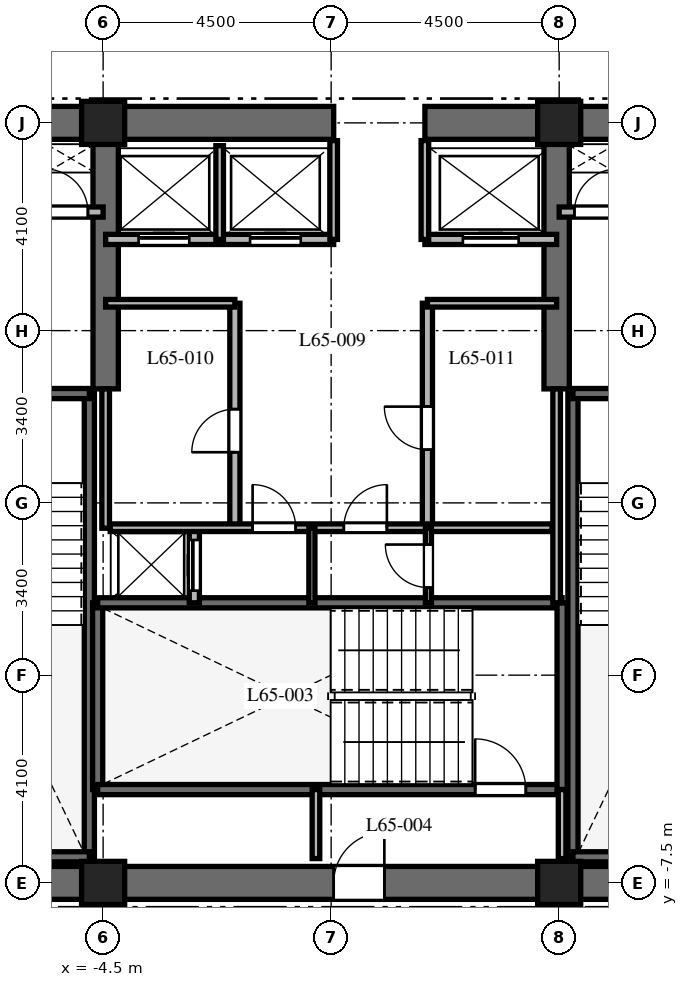
"""IFC4 building model, lengths in metres.
Left out: names, types, materials, properties, quantities, classifications, styles, units other than length and angle.
Written with IfcOpenShell. Run it as: python <this file> out.ifc"""

import sys

from ifc_helpers import new_model, si_unit, direction, frame, frame_2d, origin, origin_2d, place, context, subcontext, project, spatial, rectangle, extrude, element, fill, save


model = new_model("IFC4")
c1 = context("Model", 3, precision=1e-05, world=origin(), true_north=direction((0.0, 1.0)))
c2 = subcontext(c1, "Body", "Model", "MODEL_VIEW")
j1 = project(units=[si_unit("LENGTHUNIT", "METRE"), si_unit("PLANEANGLEUNIT", "RADIAN")], contexts=[c1])
p1 = place(None, origin())
s1 = spatial("IfcSite", under=j1, at=p1, CompositionType="ELEMENT")
p2 = place(p1, origin())
s2 = spatial("IfcBuilding", under=s1, at=p2, CompositionType="ELEMENT")
p3 = place(p2, frame((0.0, 0.0, 261.3)))
s3 = spatial("IfcBuildingStorey", under=s2, at=p3, CompositionType="ELEMENT", Elevation=261.3)
p4 = place(p3, frame((-9.325, -7.5, 0.0), z_axis=(0.0, 0.0, 1.0), x_axis=(1.0, 0.0, 0.0)))
e1 = element("IfcWall", 1, at=p4, inside=s3, PredefinedType="SHEAR", context=c2, shape_type="SweptSolid", body=[
    extrude(rectangle(XDim=18.65, YDim=0.65, at=frame_2d((9.325, 0.0))), origin(), (0.0, 0.0, 1.0), 3.9),
])
p5 = place(p4, frame((9.375, 0.0, 0.0)))
e2 = element("IfcOpeningElement", 2, at=p5, cuts=e1, PredefinedType="OPENING", context=c2, shape_type="SweptSolid", body=[
    extrude(rectangle(XDim=1.0, YDim=2.15, at=frame_2d((0.5, 1.075))), frame((0.0, 0.335, 0.0), z_axis=(0.0, -1.0, 0.0), x_axis=(1.0, 0.0, 0.0)), (0.0, 0.0, 1.0), 0.67),
])
p6 = place(p3, frame((-9.325, 7.5, 0.0), z_axis=(0.0, 0.0, 1.0), x_axis=(1.0, 0.0, 0.0)))
e3 = element("IfcWall", 3, at=p6, inside=s3, PredefinedType="SHEAR", context=c2, shape_type="SweptSolid", body=[
    extrude(rectangle(XDim=9.375, YDim=0.65, at=frame_2d((4.688, 0.0))), origin(), (0.0, 0.0, 1.0), 3.9),
])
p7 = place(p3, frame((1.85, 7.5, 0.0), z_axis=(0.0, 0.0, 1.0), x_axis=(1.0, 0.0, 0.0)))
e4 = element("IfcWall", 4, at=p7, inside=s3, PredefinedType="SHEAR", context=c2, shape_type="SweptSolid", body=[
    extrude(rectangle(XDim=7.475, YDim=0.65, at=frame_2d((3.737, 0.0))), origin(), (0.0, 0.0, 1.0), 3.9),
])
for number, where, z_axis, x_axis in (
    (5, (-4.45, 2.25, 0.0), (0.0, 0.0, 1.0), (0.0, 1.0, 0.0)),
    (6, (4.45, 2.25, 0.0), (0.0, 0.0, 1.0), (0.0, 1.0, 0.0)),
):
    element("IfcWall", number, at=place(p3, frame(where, z_axis=z_axis, x_axis=x_axis)), inside=s3, PredefinedType="SHEAR", context=c2, shape_type="SweptSolid", body=[
        extrude(rectangle(XDim=4.925, YDim=0.5, at=frame_2d((2.462, 0.0))), origin(), (0.0, 0.0, 1.0), 3.9),
    ])
p8 = place(p3, frame((-4.772, -6.985, 0.0), z_axis=(0.0, 0.0, 1.0), x_axis=(0.0, 1.0, 0.0)))
e7 = element("IfcWall", 7, at=p8, inside=s3, PredefinedType="SHEAR", context=c2, shape_type="SweptSolid", body=[
    extrude(rectangle(XDim=9.143, YDim=0.2, at=frame_2d((4.572, 0.0))), origin(), (0.0, 0.0, 1.0), 3.9),
])
p9 = place(p3, frame((-8.458, -6.985, 0.0), z_axis=(0.0, 0.0, 1.0), x_axis=(1.0, 0.0, 0.0)))
e8 = element("IfcWall", 8, at=p9, inside=s3, PredefinedType="SHEAR", context=c2, shape_type="SweptSolid", body=[
    extrude(rectangle(XDim=3.686, YDim=0.2, at=frame_2d((1.843, 0.0))), origin(), (0.0, 0.0, 1.0), 3.9),
])
p10 = place(p3, frame((-8.458, 2.158, 0.0), z_axis=(0.0, 0.0, 1.0), x_axis=(1.0, 0.0, 0.0)))
e9 = element("IfcWall", 9, at=p10, inside=s3, PredefinedType="SHEAR", context=c2, shape_type="SweptSolid", body=[
    extrude(rectangle(XDim=3.686, YDim=0.2, at=frame_2d((1.843, 0.0))), origin(), (0.0, 0.0, 1.0), 3.9),
])
p11 = place(p10, frame((1.3, 0.0, 0.0)))
e10 = element("IfcOpeningElement", 10, at=p11, cuts=e9, PredefinedType="OPENING", context=c2, shape_type="SweptSolid", body=[
    extrude(rectangle(XDim=1.0, YDim=2.15, at=frame_2d((0.5, 1.075))), frame((0.0, 0.11, 0.0), z_axis=(0.0, -1.0, 0.0), x_axis=(1.0, 0.0, 0.0)), (0.0, 0.0, 1.0), 0.22),
])
p12 = place(p3, frame((4.772, -6.985, 0.0), z_axis=(0.0, 0.0, 1.0), x_axis=(0.0, 1.0, 0.0)))
e11 = element("IfcWall", 11, at=p12, inside=s3, PredefinedType="SHEAR", context=c2, shape_type="SweptSolid", body=[
    extrude(rectangle(XDim=9.143, YDim=0.2, at=frame_2d((4.572, 0.0))), origin(), (0.0, 0.0, 1.0), 3.9),
])
p13 = place(p3, frame((4.772, -6.985, 0.0), z_axis=(0.0, 0.0, 1.0), x_axis=(1.0, 0.0, 0.0)))
e12 = element("IfcWall", 12, at=p13, inside=s3, PredefinedType="SHEAR", context=c2, shape_type="SweptSolid", body=[
    extrude(rectangle(XDim=3.686, YDim=0.2, at=frame_2d((1.843, 0.0))), origin(), (0.0, 0.0, 1.0), 3.9),
])
p14 = place(p3, frame((4.772, 2.158, 0.0), z_axis=(0.0, 0.0, 1.0), x_axis=(1.0, 0.0, 0.0)))
e13 = element("IfcWall", 13, at=p14, inside=s3, PredefinedType="SHEAR", context=c2, shape_type="SweptSolid", body=[
    extrude(rectangle(XDim=3.686, YDim=0.2, at=frame_2d((1.843, 0.0))), origin(), (0.0, 0.0, 1.0), 3.9),
])
p15 = place(p14, frame((1.35, 0.0, 0.0)))
e14 = element("IfcOpeningElement", 14, at=p15, cuts=e13, PredefinedType="OPENING", context=c2, shape_type="SweptSolid", body=[
    extrude(rectangle(XDim=1.0, YDim=2.15, at=frame_2d((0.5, 1.075))), frame((0.0, 0.11, 0.0), z_axis=(0.0, -1.0, 0.0), x_axis=(1.0, 0.0, 0.0)), (0.0, 0.0, 1.0), 0.22),
])
p16 = place(p3, frame((-4.608, -5.658, 0.0), z_axis=(0.0, 0.0, 1.0), x_axis=(0.0, 1.0, 0.0)))
e15 = element("IfcWall", 15, at=p16, inside=s3, PredefinedType="SHEAR", context=c2, shape_type="SweptSolid", body=[
    extrude(rectangle(XDim=3.686, YDim=0.2, at=frame_2d((1.843, 0.0))), origin(), (0.0, 0.0, 1.0), 3.9),
])
p17 = place(p3, frame((-4.608, -5.658, 0.0), z_axis=(0.0, 0.0, 1.0), x_axis=(1.0, 0.0, 0.0)))
e16 = element("IfcWall", 16, at=p17, inside=s3, PredefinedType="SHEAR", context=c2, shape_type="SweptSolid", body=[
    extrude(rectangle(XDim=9.166, YDim=0.2, at=frame_2d((4.583, 0.0))), origin(), (0.0, 0.0, 1.0), 3.9),
])
p18 = place(p17, frame((7.45, 0.0, 0.0)))
e17 = element("IfcOpeningElement", 17, at=p18, cuts=e16, PredefinedType="OPENING", context=c2, shape_type="SweptSolid", body=[
    extrude(rectangle(XDim=1.0, YDim=2.15, at=frame_2d((0.5, 1.075))), frame((0.0, 0.11, 0.0), z_axis=(0.0, -1.0, 0.0), x_axis=(1.0, 0.0, 0.0)), (0.0, 0.0, 1.0), 0.22),
])
p19 = place(p3, frame((-4.608, -1.972, 0.0), z_axis=(0.0, 0.0, 1.0), x_axis=(1.0, 0.0, 0.0)))
e18 = element("IfcWall", 18, at=p19, inside=s3, PredefinedType="SHEAR", context=c2, shape_type="SweptSolid", body=[
    extrude(rectangle(XDim=9.166, YDim=0.2, at=frame_2d((4.583, 0.0))), origin(), (0.0, 0.0, 1.0), 3.9),
])
p20 = place(p3, frame((4.558, -5.658, 0.0), z_axis=(0.0, 0.0, 1.0), x_axis=(0.0, 1.0, 0.0)))
e19 = element("IfcWall", 19, at=p20, inside=s3, PredefinedType="SHEAR", context=c2, shape_type="SweptSolid", body=[
    extrude(rectangle(XDim=3.686, YDim=0.2, at=frame_2d((1.843, 0.0))), origin(), (0.0, 0.0, 1.0), 3.9),
])
for number, where, z_axis, x_axis in (
    (20, (-4.5, -7.5, 0.0), (0.0, 0.0, 1.0), (1.0, 0.0, 0.0)),
    (21, (4.5, -7.5, 0.0), (0.0, 0.0, 1.0), (1.0, 0.0, 0.0)),
    (22, (4.5, 7.5, 0.0), (0.0, 0.0, 1.0), (1.0, 0.0, 0.0)),
    (23, (-4.5, 7.5, 0.0), (0.0, 0.0, 1.0), (1.0, 0.0, 0.0)),
):
    element("IfcColumn", number, at=place(p3, frame(where, z_axis=z_axis, x_axis=x_axis)), inside=s3, PredefinedType="COLUMN", context=c2, shape_type="SweptSolid", body=[
        extrude(rectangle(XDim=0.85, YDim=0.85, at=origin_2d()), origin(), (0.0, 0.0, 1.0), 3.9),
    ])
for number, where, z_axis, x_axis in (
    (24, (-0.3, -7.02, 0.0), (0.0, 0.0, 1.0), (0.0, 1.0, 0.0)),
    (25, (4.558, -7.02, 0.0), (0.0, 0.0, 1.0), (0.0, 1.0, 0.0)),
):
    element("IfcWall", number, at=place(p3, frame(where, z_axis=z_axis, x_axis=x_axis)), inside=s3, PredefinedType="PARTITIONING", context=c2, shape_type="SweptSolid", body=[
        extrude(rectangle(XDim=1.362, YDim=0.15, at=frame_2d((0.681, 0.0))), origin(), (0.0, 0.0, 1.0), 3.6),
    ])
p21 = place(p3, frame((-8.55, 5.74, 0.0), z_axis=(0.0, 0.0, 1.0), x_axis=(1.0, 0.0, 0.0)))
e26 = element("IfcWall", 26, at=p21, inside=s3, PredefinedType="PARTITIONING", context=c2, shape_type="SweptSolid", body=[
    extrude(rectangle(XDim=4.05, YDim=0.2, at=frame_2d((2.025, 0.0))), origin(), (0.0, 0.0, 1.0), 3.6),
])
p22 = place(p21, frame((0.75, 0.0, 0.0)))
e27 = element("IfcOpeningElement", 27, at=p22, cuts=e26, PredefinedType="OPENING", context=c2, shape_type="SweptSolid", body=[
    extrude(rectangle(XDim=1.1, YDim=2.2, at=frame_2d((0.55, 1.1))), frame((0.0, 0.11, 0.0), z_axis=(0.0, -1.0, 0.0), x_axis=(1.0, 0.0, 0.0)), (0.0, 0.0, 1.0), 0.22),
])
p23 = place(p21, frame((2.9, 0.0, 0.0)))
e28 = element("IfcOpeningElement", 28, at=p23, cuts=e26, PredefinedType="OPENING", context=c2, shape_type="SweptSolid", body=[
    extrude(rectangle(XDim=0.85, YDim=2.03, at=frame_2d((0.425, 1.015))), frame((0.0, 0.11, 0.0), z_axis=(0.0, -1.0, 0.0), x_axis=(1.0, 0.0, 0.0)), (0.0, 0.0, 1.0), 0.22),
])
p24 = place(p3, frame((4.5, 5.74, 0.0), z_axis=(0.0, 0.0, 1.0), x_axis=(1.0, 0.0, 0.0)))
e29 = element("IfcWall", 29, at=p24, inside=s3, PredefinedType="PARTITIONING", context=c2, shape_type="SweptSolid", body=[
    extrude(rectangle(XDim=4.05, YDim=0.2, at=frame_2d((2.025, 0.0))), origin(), (0.0, 0.0, 1.0), 3.6),
])
p25 = place(p24, frame((0.3, 0.0, 0.0)))
e30 = element("IfcOpeningElement", 30, at=p25, cuts=e29, PredefinedType="OPENING", context=c2, shape_type="SweptSolid", body=[
    extrude(rectangle(XDim=0.85, YDim=2.03, at=frame_2d((0.425, 1.015))), frame((0.0, 0.11, 0.0), z_axis=(0.0, -1.0, 0.0), x_axis=(1.0, 0.0, 0.0)), (0.0, 0.0, 1.0), 0.22),
])
p26 = place(p24, frame((2.15, 0.0, 0.0)))
e31 = element("IfcOpeningElement", 31, at=p26, cuts=e29, PredefinedType="OPENING", context=c2, shape_type="SweptSolid", body=[
    extrude(rectangle(XDim=1.1, YDim=2.2, at=frame_2d((0.55, 1.1))), frame((0.0, 0.11, 0.0), z_axis=(0.0, -1.0, 0.0), x_axis=(1.0, 0.0, 0.0)), (0.0, 0.0, 1.0), 0.22),
])
p27 = place(p3, frame((-2.7, -1.972, 0.0), z_axis=(0.0, 0.0, 1.0), x_axis=(0.0, 1.0, 0.0)))
e32 = element("IfcWall", 32, at=p27, inside=s3, PredefinedType="PARTITIONING", context=c2, shape_type="SweptSolid", body=[
    extrude(rectangle(XDim=1.472, YDim=0.2, at=frame_2d((0.736, 0.0))), origin(), (0.0, 0.0, 1.0), 3.6),
])
p28 = place(p27, frame((0.24, 0.0, 0.0)))
e33 = element("IfcOpeningElement", 33, at=p28, cuts=e32, PredefinedType="OPENING", context=c2, shape_type="SweptSolid", body=[
    extrude(rectangle(XDim=1.0, YDim=2.2, at=frame_2d((0.5, 1.1))), frame((0.0, 0.11, 0.0), z_axis=(0.0, -1.0, 0.0), x_axis=(1.0, 0.0, 0.0)), (0.0, 0.0, 1.0), 0.22),
])
p29 = place(p3, frame((-4.45, 5.2, 0.0), z_axis=(0.0, 0.0, 1.0), x_axis=(1.0, 0.0, 0.0)))
e34 = element("IfcWall", 34, at=p29, inside=s3, PredefinedType="PARTITIONING", context=c2, shape_type="SweptSolid", body=[
    extrude(rectangle(XDim=4.5, YDim=0.2, at=frame_2d((2.25, 0.0))), origin(), (0.0, 0.0, 1.0), 3.6),
])
p30 = place(p29, frame((0.65, 0.0, 0.0)))
e35 = element("IfcOpeningElement", 35, at=p30, cuts=e34, PredefinedType="OPENING", context=c2, shape_type="SweptSolid", body=[
    extrude(rectangle(XDim=1.0, YDim=2.2, at=frame_2d((0.5, 1.1))), frame((0.0, 0.11, 0.0), z_axis=(0.0, -1.0, 0.0), x_axis=(1.0, 0.0, 0.0)), (0.0, 0.0, 1.0), 0.22),
])
p31 = place(p29, frame((2.85, 0.0, 0.0)))
e36 = element("IfcOpeningElement", 36, at=p31, cuts=e34, PredefinedType="OPENING", context=c2, shape_type="SweptSolid", body=[
    extrude(rectangle(XDim=1.0, YDim=2.2, at=frame_2d((0.5, 1.1))), frame((0.0, 0.11, 0.0), z_axis=(0.0, -1.0, 0.0), x_axis=(1.0, 0.0, 0.0)), (0.0, 0.0, 1.0), 0.22),
])
p32 = place(p3, frame((1.85, 5.2, 0.0), z_axis=(0.0, 0.0, 1.0), x_axis=(1.0, 0.0, 0.0)))
e37 = element("IfcWall", 37, at=p32, inside=s3, PredefinedType="PARTITIONING", context=c2, shape_type="SweptSolid", body=[
    extrude(rectangle(XDim=2.6, YDim=0.2, at=frame_2d((1.3, 0.0))), origin(), (0.0, 0.0, 1.0), 3.6),
])
p33 = place(p32, frame((0.75, 0.0, 0.0)))
e38 = element("IfcOpeningElement", 38, at=p33, cuts=e37, PredefinedType="OPENING", context=c2, shape_type="SweptSolid", body=[
    extrude(rectangle(XDim=1.1, YDim=2.2, at=frame_2d((0.55, 1.1))), frame((0.0, 0.11, 0.0), z_axis=(0.0, -1.0, 0.0), x_axis=(1.0, 0.0, 0.0)), (0.0, 0.0, 1.0), 0.22),
])
p34 = place(p3, frame((-2.2, 5.2, 0.0), z_axis=(0.0, 0.0, 1.0), x_axis=(0.0, 1.0, 0.0)))
e39 = element("IfcWall", 39, at=p34, inside=s3, PredefinedType="PARTITIONING", context=c2, shape_type="SweptSolid", body=[
    extrude(rectangle(XDim=1.85, YDim=0.15, at=frame_2d((0.925, 0.0))), origin(), (0.0, 0.0, 1.0), 3.6),
])
for number, where, z_axis, x_axis in (
    (40, (0.05, 5.2, 0.0), (0.0, 0.0, 1.0), (0.0, 1.0, 0.0)),
    (41, (1.85, 5.2, 0.0), (0.0, 0.0, 1.0), (0.0, 1.0, 0.0)),
):
    element("IfcWall", number, at=place(p3, frame(where, z_axis=z_axis, x_axis=x_axis)), inside=s3, PredefinedType="PARTITIONING", context=c2, shape_type="SweptSolid", body=[
        extrude(rectangle(XDim=1.95, YDim=0.15, at=frame_2d((0.975, 0.0))), origin(), (0.0, 0.0, 1.0), 3.6),
    ])
p35 = place(p3, frame((-4.45, -0.5, 0.0), z_axis=(0.0, 0.0, 1.0), x_axis=(0.0, 1.0, 0.0)))
e42 = element("IfcWall", 42, at=p35, inside=s3, PredefinedType="PARTITIONING", context=c2, shape_type="SweptSolid", body=[
    extrude(rectangle(XDim=2.75, YDim=0.15, at=frame_2d((1.375, 0.0))), origin(), (0.0, 0.0, 1.0), 3.6),
])
p36 = place(p3, frame((4.45, -1.972, 0.0), z_axis=(0.0, 0.0, 1.0), x_axis=(0.0, 1.0, 0.0)))
e43 = element("IfcWall", 43, at=p36, inside=s3, PredefinedType="PARTITIONING", context=c2, shape_type="SweptSolid", body=[
    extrude(rectangle(XDim=4.222, YDim=0.15, at=frame_2d((2.111, 0.0))), origin(), (0.0, 0.0, 1.0), 3.6),
])
p37 = place(p3, frame((-1.9, -0.5, 0.0), z_axis=(0.0, 0.0, 1.0), x_axis=(0.0, 1.0, 0.0)))
e44 = element("IfcWall", 44, at=p37, inside=s3, PredefinedType="PARTITIONING", context=c2, shape_type="SweptSolid", body=[
    extrude(rectangle(XDim=4.44, YDim=0.2, at=frame_2d((2.22, 0.0))), origin(), (0.0, 0.0, 1.0), 3.6),
])
p38 = place(p37, frame((1.5, 0.0, 0.0)))
e45 = element("IfcOpeningElement", 45, at=p38, cuts=e44, PredefinedType="OPENING", context=c2, shape_type="SweptSolid", body=[
    extrude(rectangle(XDim=0.85, YDim=2.03, at=frame_2d((0.425, 1.015))), frame((0.0, 0.11, 0.0), z_axis=(0.0, -1.0, 0.0), x_axis=(1.0, 0.0, 0.0)), (0.0, 0.0, 1.0), 0.22),
])
p39 = place(p3, frame((-4.45, 3.94, 0.0), z_axis=(0.0, 0.0, 1.0), x_axis=(1.0, 0.0, 0.0)))
e46 = element("IfcWall", 46, at=p39, inside=s3, PredefinedType="PARTITIONING", context=c2, shape_type="SweptSolid", body=[
    extrude(rectangle(XDim=2.55, YDim=0.15, at=frame_2d((1.275, 0.0))), origin(), (0.0, 0.0, 1.0), 3.6),
])
p40 = place(p3, frame((1.9, -0.5, 0.0), z_axis=(0.0, 0.0, 1.0), x_axis=(0.0, 1.0, 0.0)))
e47 = element("IfcWall", 47, at=p40, inside=s3, PredefinedType="PARTITIONING", context=c2, shape_type="SweptSolid", body=[
    extrude(rectangle(XDim=4.44, YDim=0.2, at=frame_2d((2.22, 0.0))), origin(), (0.0, 0.0, 1.0), 3.6),
])
p41 = place(p40, frame((1.55, 0.0, 0.0)))
e48 = element("IfcOpeningElement", 48, at=p41, cuts=e47, PredefinedType="OPENING", context=c2, shape_type="SweptSolid", body=[
    extrude(rectangle(XDim=0.85, YDim=2.03, at=frame_2d((0.425, 1.015))), frame((0.0, 0.11, 0.0), z_axis=(0.0, -1.0, 0.0), x_axis=(1.0, 0.0, 0.0)), (0.0, 0.0, 1.0), 0.22),
])
p42 = place(p3, frame((1.9, 3.94, 0.0), z_axis=(0.0, 0.0, 1.0), x_axis=(1.0, 0.0, 0.0)))
e49 = element("IfcWall", 49, at=p42, inside=s3, PredefinedType="PARTITIONING", context=c2, shape_type="SweptSolid", body=[
    extrude(rectangle(XDim=2.55, YDim=0.15, at=frame_2d((1.275, 0.0))), origin(), (0.0, 0.0, 1.0), 3.6),
])
p43 = place(p3, frame((-4.36, -0.49, 0.0), z_axis=(0.0, 0.0, 1.0), x_axis=(1.0, 0.0, 0.0)))
e50 = element("IfcWall", 50, at=p43, inside=s3, PredefinedType="PARTITIONING", context=c2, shape_type="SweptSolid", body=[
    extrude(rectangle(XDim=8.72, YDim=0.15, at=frame_2d((4.36, 0.0))), origin(), (0.0, 0.0, 1.0), 3.6),
])
p44 = place(p43, frame((2.81, 0.0, 0.0)))
e51 = element("IfcOpeningElement", 51, at=p44, cuts=e50, PredefinedType="OPENING", context=c2, shape_type="SweptSolid", body=[
    extrude(rectangle(XDim=0.85, YDim=2.03, at=frame_2d((0.425, 1.015))), frame((0.0, 0.085, 0.0), z_axis=(0.0, -1.0, 0.0), x_axis=(1.0, 0.0, 0.0)), (0.0, 0.0, 1.0), 0.17),
])
p45 = place(p43, frame((4.61, 0.0, 0.0)))
e52 = element("IfcOpeningElement", 52, at=p45, cuts=e50, PredefinedType="OPENING", context=c2, shape_type="SweptSolid", body=[
    extrude(rectangle(XDim=0.85, YDim=2.03, at=frame_2d((0.425, 1.015))), frame((0.0, 0.085, 0.0), z_axis=(0.0, -1.0, 0.0), x_axis=(1.0, 0.0, 0.0)), (0.0, 0.0, 1.0), 0.17),
])
p46 = place(p3, frame((-0.38, -1.972, 0.0), z_axis=(0.0, 0.0, 1.0), x_axis=(0.0, 1.0, 0.0)))
e53 = element("IfcWall", 53, at=p46, inside=s3, PredefinedType="PARTITIONING", context=c2, shape_type="SweptSolid", body=[
    extrude(rectangle(XDim=1.472, YDim=0.12, at=frame_2d((0.736, 0.0))), origin(), (0.0, 0.0, 1.0), 3.6),
])
p47 = place(p3, frame((1.92, -1.972, 0.0), z_axis=(0.0, 0.0, 1.0), x_axis=(0.0, 1.0, 0.0)))
e54 = element("IfcWall", 54, at=p47, inside=s3, PredefinedType="PARTITIONING", context=c2, shape_type="SweptSolid", body=[
    extrude(rectangle(XDim=1.472, YDim=0.12, at=frame_2d((0.736, 0.0))), origin(), (0.0, 0.0, 1.0), 3.6),
])
p48 = place(p47, frame((0.3, 0.0, 0.0)))
e55 = element("IfcOpeningElement", 55, at=p48, cuts=e54, PredefinedType="OPENING", context=c2, shape_type="SweptSolid", body=[
    extrude(rectangle(XDim=0.85, YDim=2.03, at=frame_2d((0.425, 1.015))), frame((0.0, 0.07, 0.0), z_axis=(0.0, -1.0, 0.0), x_axis=(1.0, 0.0, 0.0)), (0.0, 0.0, 1.0), 0.14),
])
p49 = place(p18, origin())
e56 = element("IfcDoor", 56, at=p49, inside=s3, OperationType="SINGLE_SWING_LEFT", PredefinedType="DOOR", context=c2, shape_type="SweptSolid", body=[
    extrude(rectangle(XDim=1.0, YDim=2.15, at=frame_2d((0.5, 1.075))), frame((0.0, 0.025, 0.0), z_axis=(0.0, -1.0, 0.0), x_axis=(1.0, 0.0, 0.0)), (0.0, 0.0, 1.0), 0.05),
])
fill(e17, e56)
p50 = place(p5, origin())
e57 = element("IfcDoor", 57, at=p50, inside=s3, OperationType="SINGLE_SWING_RIGHT", PredefinedType="DOOR", context=c2, shape_type="SweptSolid", body=[
    extrude(rectangle(XDim=1.0, YDim=2.15, at=frame_2d((0.5, 1.075))), frame((0.0, 0.025, 0.0), z_axis=(0.0, -1.0, 0.0), x_axis=(1.0, 0.0, 0.0)), (0.0, 0.0, 1.0), 0.05),
])
fill(e2, e57)
p51 = place(p23, origin())
e58 = element("IfcDoor", 58, at=p51, inside=s3, OperationType="SINGLE_SWING_LEFT", PredefinedType="DOOR", context=c2, shape_type="SweptSolid", body=[
    extrude(rectangle(XDim=0.85, YDim=2.03, at=frame_2d((0.425, 1.015))), frame((0.0, 0.025, 0.0), z_axis=(0.0, -1.0, 0.0), x_axis=(1.0, 0.0, 0.0)), (0.0, 0.0, 1.0), 0.05),
])
fill(e28, e58)
p52 = place(p25, origin())
e59 = element("IfcDoor", 59, at=p52, inside=s3, OperationType="SINGLE_SWING_RIGHT", PredefinedType="DOOR", context=c2, shape_type="SweptSolid", body=[
    extrude(rectangle(XDim=0.85, YDim=2.03, at=frame_2d((0.425, 1.015))), frame((0.0, 0.025, 0.0), z_axis=(0.0, -1.0, 0.0), x_axis=(1.0, 0.0, 0.0)), (0.0, 0.0, 1.0), 0.05),
])
fill(e30, e59)
p53 = place(p28, origin())
e60 = element("IfcDoor", 60, at=p53, inside=s3, OperationType="SLIDING_TO_LEFT", PredefinedType="DOOR", context=c2, shape_type="SweptSolid", body=[
    extrude(rectangle(XDim=1.0, YDim=2.2, at=frame_2d((0.5, 1.1))), frame((0.0, 0.025, 0.0), z_axis=(0.0, -1.0, 0.0), x_axis=(1.0, 0.0, 0.0)), (0.0, 0.0, 1.0), 0.05),
])
fill(e33, e60)
p54 = place(p30, origin())
e61 = element("IfcDoor", 61, at=p54, inside=s3, OperationType="SLIDING_TO_LEFT", PredefinedType="DOOR", context=c2, shape_type="SweptSolid", body=[
    extrude(rectangle(XDim=1.0, YDim=2.2, at=frame_2d((0.5, 1.1))), frame((0.0, 0.025, 0.0), z_axis=(0.0, -1.0, 0.0), x_axis=(1.0, 0.0, 0.0)), (0.0, 0.0, 1.0), 0.05),
])
fill(e35, e61)
p55 = place(p31, origin())
e62 = element("IfcDoor", 62, at=p55, inside=s3, OperationType="SLIDING_TO_RIGHT", PredefinedType="DOOR", context=c2, shape_type="SweptSolid", body=[
    extrude(rectangle(XDim=1.0, YDim=2.2, at=frame_2d((0.5, 1.1))), frame((0.0, 0.025, 0.0), z_axis=(0.0, -1.0, 0.0), x_axis=(1.0, 0.0, 0.0)), (0.0, 0.0, 1.0), 0.05),
])
fill(e36, e62)
p56 = place(p33, origin())
e63 = element("IfcDoor", 63, at=p56, inside=s3, OperationType="SLIDING_TO_RIGHT", PredefinedType="DOOR", context=c2, shape_type="SweptSolid", body=[
    extrude(rectangle(XDim=1.1, YDim=2.2, at=frame_2d((0.55, 1.1))), frame((0.0, 0.025, 0.0), z_axis=(0.0, -1.0, 0.0), x_axis=(1.0, 0.0, 0.0)), (0.0, 0.0, 1.0), 0.05),
])
fill(e38, e63)
p57 = place(p38, origin())
e64 = element("IfcDoor", 64, at=p57, inside=s3, OperationType="SINGLE_SWING_LEFT", PredefinedType="DOOR", context=c2, shape_type="SweptSolid", body=[
    extrude(rectangle(XDim=0.85, YDim=2.03, at=frame_2d((0.425, 1.015))), frame((0.0, 0.025, 0.0), z_axis=(0.0, -1.0, 0.0), x_axis=(1.0, 0.0, 0.0)), (0.0, 0.0, 1.0), 0.05),
])
fill(e45, e64)
p58 = place(p41, origin())
e65 = element("IfcDoor", 65, at=p58, inside=s3, OperationType="SINGLE_SWING_RIGHT", PredefinedType="DOOR", context=c2, shape_type="SweptSolid", body=[
    extrude(rectangle(XDim=0.85, YDim=2.03, at=frame_2d((0.425, 1.015))), frame((0.0, 0.025, 0.0), z_axis=(0.0, -1.0, 0.0), x_axis=(1.0, 0.0, 0.0)), (0.0, 0.0, 1.0), 0.05),
])
fill(e48, e65)
p59 = place(p44, origin())
e66 = element("IfcDoor", 66, at=p59, inside=s3, OperationType="SINGLE_SWING_LEFT", PredefinedType="DOOR", context=c2, shape_type="SweptSolid", body=[
    extrude(rectangle(XDim=0.85, YDim=2.03, at=frame_2d((0.425, 1.015))), frame((0.0, 0.025, 0.0), z_axis=(0.0, -1.0, 0.0), x_axis=(1.0, 0.0, 0.0)), (0.0, 0.0, 1.0), 0.05),
])
fill(e51, e66)
p60 = place(p45, origin())
e67 = element("IfcDoor", 67, at=p60, inside=s3, OperationType="SINGLE_SWING_RIGHT", PredefinedType="DOOR", context=c2, shape_type="SweptSolid", body=[
    extrude(rectangle(XDim=0.85, YDim=2.03, at=frame_2d((0.425, 1.015))), frame((0.0, 0.025, 0.0), z_axis=(0.0, -1.0, 0.0), x_axis=(1.0, 0.0, 0.0)), (0.0, 0.0, 1.0), 0.05),
])
fill(e52, e67)
p61 = place(p48, origin())
e68 = element("IfcDoor", 68, at=p61, inside=s3, OperationType="SINGLE_SWING_RIGHT", PredefinedType="DOOR", context=c2, shape_type="SweptSolid", body=[
    extrude(rectangle(XDim=0.85, YDim=2.03, at=frame_2d((0.425, 1.015))), frame((0.0, 0.025, 0.0), z_axis=(0.0, -1.0, 0.0), x_axis=(1.0, 0.0, 0.0)), (0.0, 0.0, 1.0), 0.05),
])
fill(e55, e68)
save(model, sys.argv[1])
